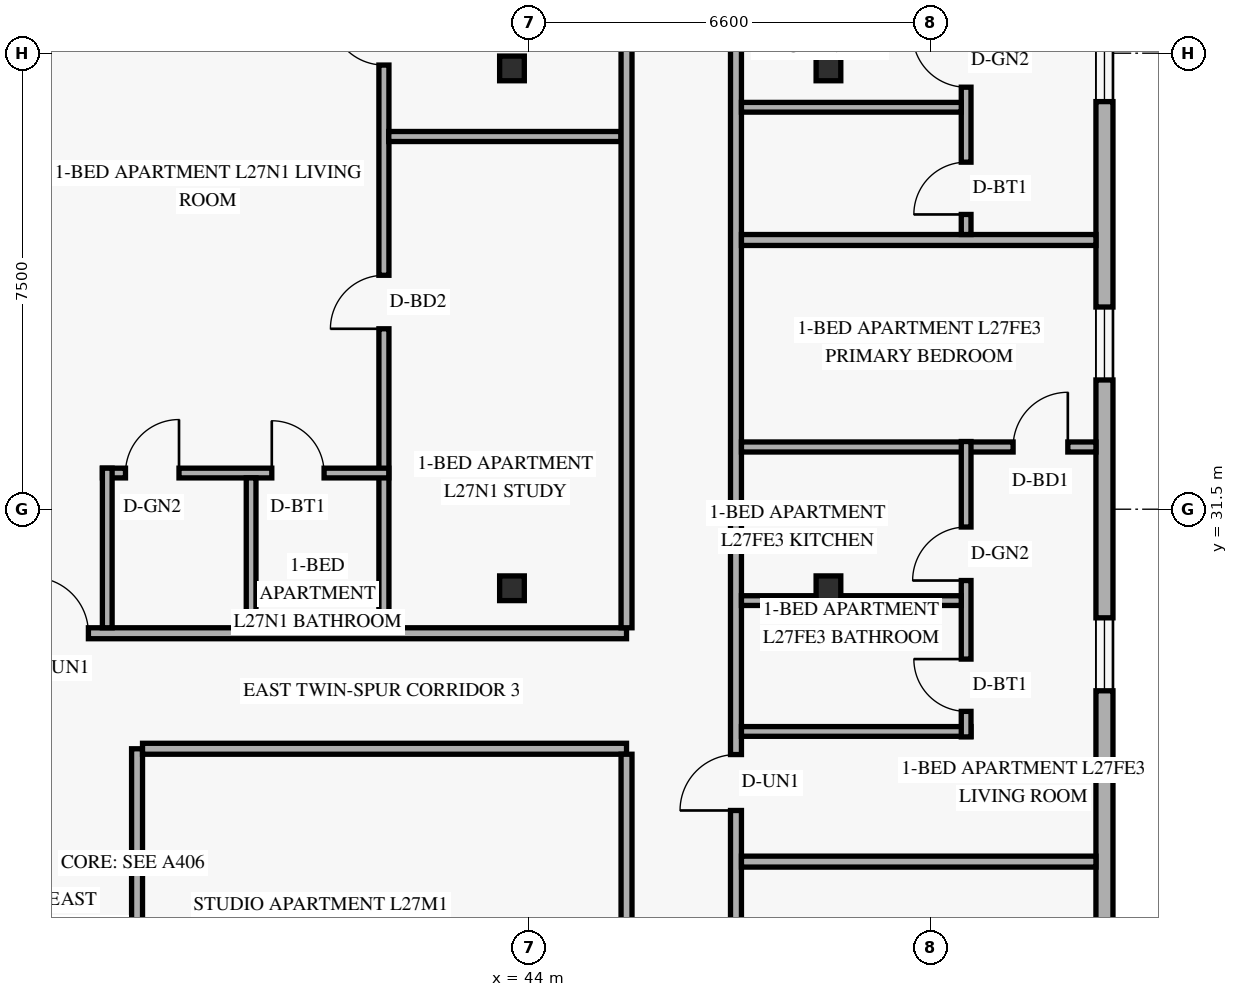
"""IFC4 building model, lengths in metres.
Left out: names, types, materials, properties, quantities, classifications, styles, units other than length and angle.
Written with IfcOpenShell. Run it as: python <this file> out.ifc"""

import sys

from ifc_helpers import new_model, si_unit, direction, frame, frame_2d, origin, origin_2d, place, context, subcontext, project, spatial, rectangle, hollow_rectangle, extrude, element, fill, save


model = new_model("IFC4")
c1 = context("Model", 3, precision=1e-05, world=origin(), true_north=direction((0.0, 1.0)))
c2 = subcontext(c1, "Body", "Model", "MODEL_VIEW")
j1 = project(units=[si_unit("LENGTHUNIT", "METRE"), si_unit("PLANEANGLEUNIT", "RADIAN")], contexts=[c1])
p1 = place(None, origin())
s1 = spatial("IfcSite", under=j1, at=p1, CompositionType="ELEMENT")
p2 = place(p1, origin())
s2 = spatial("IfcBuilding", under=s1, at=p2, CompositionType="ELEMENT")
p3 = place(p2, frame((0.0, 0.0, 106.2)))
s3 = spatial("IfcBuildingStorey", under=s2, at=p3, CompositionType="ELEMENT", Elevation=106.2)
for number, where, z_axis, x_axis in (
    (1, (43.653, 30.2, 0.0), (0.035, 0.0, 0.999), (0.0, 1.0, 0.0)),
    (2, (43.653, 38.75, 0.0), (0.035, 0.0, 0.999), (0.0, 1.0, 0.0)),
):
    element("IfcColumn", number, at=place(p3, frame(where, z_axis=z_axis, x_axis=x_axis)), inside=s3, PredefinedType="COLUMN", context=c2, shape_type="SweptSolid", body=[
        extrude(hollow_rectangle(XDim=0.406, YDim=0.406, WallThickness=0.016, at=origin_2d()), origin(), (0.0, 0.0, 1.0), 3.602),
    ])
for number, where, z_axis, x_axis in (
    (3, (48.816, 30.2, 0.0), (0.058, 0.0, 0.998), (0.0, 1.0, 0.0)),
    (4, (48.816, 38.75, 0.0), (0.058, 0.0, 0.998), (0.0, 1.0, 0.0)),
):
    element("IfcColumn", number, at=place(p3, frame(where, z_axis=z_axis, x_axis=x_axis)), inside=s3, PredefinedType="COLUMN", context=c2, shape_type="SweptSolid", body=[
        extrude(hollow_rectangle(XDim=0.406, YDim=0.406, WallThickness=0.016, at=origin_2d()), origin(), (0.0, 0.0, 1.0), 3.606),
    ])
p4 = place(p3, frame((53.46, 6.32, 0.0), z_axis=(0.0, 0.0, 1.0), x_axis=(0.0, 1.0, 0.0)))
e5 = element("IfcWall", 5, at=p4, inside=s3, PredefinedType="SOLIDWALL", context=c2, shape_type="SweptSolid", body=[
    extrude(rectangle(XDim=35.36, YDim=0.28, at=frame_2d((17.68, 0.0))), origin(), (0.0, 0.0, 1.0), 3.36),
])
p5 = place(p4, frame((3.128, 0.0, 0.85)))
e6 = element("IfcOpeningElement", 6, at=p5, cuts=e5, PredefinedType="OPENING", context=c2, shape_type="SweptSolid", body=[
    extrude(rectangle(XDim=1.2, YDim=1.5, at=frame_2d((0.6, 0.75))), frame((0.0, 0.15, 0.0), z_axis=(0.0, -1.0, 0.0), x_axis=(1.0, 0.0, 0.0)), (0.0, 0.0, 1.0), 0.3),
])
p6 = place(p4, frame((12.82, 0.0, 0.85)))
e7 = element("IfcOpeningElement", 7, at=p6, cuts=e5, PredefinedType="OPENING", context=c2, shape_type="SweptSolid", body=[
    extrude(rectangle(XDim=1.2, YDim=1.5, at=frame_2d((0.6, 0.75))), frame((0.0, 0.15, 0.0), z_axis=(0.0, -1.0, 0.0), x_axis=(1.0, 0.0, 0.0)), (0.0, 0.0, 1.0), 0.3),
])
p7 = place(p4, frame((22.194, 0.0, 0.85)))
e8 = element("IfcOpeningElement", 8, at=p7, cuts=e5, PredefinedType="OPENING", context=c2, shape_type="SweptSolid", body=[
    extrude(rectangle(XDim=1.2, YDim=1.5, at=frame_2d((0.6, 0.75))), frame((0.0, 0.15, 0.0), z_axis=(0.0, -1.0, 0.0), x_axis=(1.0, 0.0, 0.0)), (0.0, 0.0, 1.0), 0.3),
])
p8 = place(p4, frame((27.306, 0.0, 0.85)))
e9 = element("IfcOpeningElement", 9, at=p8, cuts=e5, PredefinedType="OPENING", context=c2, shape_type="SweptSolid", body=[
    extrude(rectangle(XDim=1.2, YDim=1.5, at=frame_2d((0.6, 0.75))), frame((0.0, 0.15, 0.0), z_axis=(0.0, -1.0, 0.0), x_axis=(1.0, 0.0, 0.0)), (0.0, 0.0, 1.0), 0.3),
])
p9 = place(p4, frame((31.884, 0.0, 0.85)))
e10 = element("IfcOpeningElement", 10, at=p9, cuts=e5, PredefinedType="OPENING", context=c2, shape_type="SweptSolid", body=[
    extrude(rectangle(XDim=1.2, YDim=1.5, at=frame_2d((0.6, 0.75))), frame((0.0, 0.15, 0.0), z_axis=(0.0, -1.0, 0.0), x_axis=(1.0, 0.0, 0.0)), (0.0, 0.0, 1.0), 0.3),
])
p10 = place(p3, frame((37.55, 17.28, 0.0), z_axis=(0.0, 0.0, 1.0), x_axis=(0.0, 1.0, 0.0)))
e11 = element("IfcWall", 11, at=p10, inside=s3, PredefinedType="STANDARD", context=c2, shape_type="SweptSolid", body=[
    extrude(rectangle(XDim=10.28, YDim=0.18, at=frame_2d((5.14, 0.0))), origin(), (0.0, 0.0, 1.0), 2.731),
])
p11 = place(p10, frame((5.0, 0.0, 0.0)))
e12 = element("IfcOpeningElement", 12, at=p11, cuts=e11, PredefinedType="OPENING", context=c2, shape_type="SweptSolid", body=[
    extrude(rectangle(XDim=0.92, YDim=2.15, at=frame_2d((0.46, 1.075))), frame((0.0, 0.1, 0.0), z_axis=(0.0, -1.0, 0.0), x_axis=(1.0, 0.0, 0.0)), (0.0, 0.0, 1.0), 0.2),
])
p12 = place(p3, frame((37.64, 27.56, 0.0), z_axis=(0.0, 0.0, 1.0), x_axis=(1.0, 0.0, 0.0)))
e13 = element("IfcWall", 13, at=p12, inside=s3, PredefinedType="STANDARD", context=c2, shape_type="SweptSolid", body=[
    extrude(rectangle(XDim=7.96, YDim=0.18, at=frame_2d((3.98, 0.0))), origin(), (0.0, 0.0, 1.0), 2.731),
])
p13 = place(p3, frame((35.51, 29.46, 0.0), z_axis=(0.0, 0.0, 1.0), x_axis=(1.0, 0.0, 0.0)))
e14 = element("IfcWall", 14, at=p13, inside=s3, PredefinedType="STANDARD", context=c2, shape_type="SweptSolid", body=[
    extrude(rectangle(XDim=10.09, YDim=0.18, at=frame_2d((5.045, 0.0))), origin(), (0.0, 0.0, 1.0), 2.731),
])
p14 = place(p13, frame((0.32, 0.0, 0.0)))
e15 = element("IfcOpeningElement", 15, at=p14, cuts=e14, PredefinedType="OPENING", context=c2, shape_type="SweptSolid", body=[
    extrude(rectangle(XDim=0.92, YDim=2.15, at=frame_2d((0.46, 1.075))), frame((0.0, 0.1, 0.0), z_axis=(0.0, -1.0, 0.0), x_axis=(1.0, 0.0, 0.0)), (0.0, 0.0, 1.0), 0.2),
])
p15 = place(p3, frame((41.61, 29.55, 0.0), z_axis=(0.0, 0.0, 1.0), x_axis=(0.0, 1.0, 0.0)))
e16 = element("IfcWall", 16, at=p15, inside=s3, PredefinedType="PARTITIONING", context=c2, shape_type="SweptSolid", body=[
    extrude(rectangle(XDim=15.47, YDim=0.165, at=frame_2d((7.735, 0.0))), origin(), (0.0, 0.0, 1.0), 2.731),
])
p16 = place(p15, frame((4.917, 0.0, 0.0)))
e17 = element("IfcOpeningElement", 17, at=p16, cuts=e16, PredefinedType="OPENING", context=c2, shape_type="SweptSolid", body=[
    extrude(rectangle(XDim=0.88, YDim=2.14, at=frame_2d((0.44, 1.07))), frame((0.0, 0.093, 0.0), z_axis=(0.0, -1.0, 0.0), x_axis=(1.0, 0.0, 0.0)), (0.0, 0.0, 1.0), 0.185),
])
p17 = place(p15, frame((9.255, 0.0, 0.0)))
e18 = element("IfcOpeningElement", 18, at=p17, cuts=e16, PredefinedType="OPENING", context=c2, shape_type="SweptSolid", body=[
    extrude(rectangle(XDim=0.88, YDim=2.12, at=frame_2d((0.44, 1.06))), frame((0.0, 0.093, 0.0), z_axis=(0.0, -1.0, 0.0), x_axis=(1.0, 0.0, 0.0)), (0.0, 0.0, 1.0), 0.185),
])
p18 = place(p3, frame((36.98, 32.095, 0.0), z_axis=(0.0, 0.0, 1.0), x_axis=(1.0, 0.0, 0.0)))
e19 = element("IfcWall", 19, at=p18, inside=s3, PredefinedType="PLUMBINGWALL", context=c2, shape_type="SweptSolid", body=[
    extrude(rectangle(XDim=4.71, YDim=0.16, at=frame_2d((2.355, 0.0))), origin(), (0.0, 0.0, 1.0), 3.36),
])
p19 = place(p18, frame((0.38, 0.0, 0.0)))
e20 = element("IfcOpeningElement", 20, at=p19, cuts=e19, PredefinedType="OPENING", context=c2, shape_type="SweptSolid", body=[
    extrude(rectangle(XDim=0.88, YDim=2.12, at=frame_2d((0.44, 1.06))), frame((0.0, 0.09, 0.0), z_axis=(0.0, -1.0, 0.0), x_axis=(1.0, 0.0, 0.0)), (0.0, 0.0, 1.0), 0.18),
])
p20 = place(p18, frame((2.786, 0.0, 0.0)))
e21 = element("IfcOpeningElement", 21, at=p20, cuts=e19, PredefinedType="OPENING", context=c2, shape_type="SweptSolid", body=[
    extrude(rectangle(XDim=0.86, YDim=2.12, at=frame_2d((0.43, 1.06))), frame((0.0, 0.09, 0.0), z_axis=(0.0, -1.0, 0.0), x_axis=(1.0, 0.0, 0.0)), (0.0, 0.0, 1.0), 0.18),
])
p21 = place(p3, frame((37.06, 29.55, 0.0), z_axis=(0.0, 0.0, 1.0), x_axis=(0.0, 1.0, 0.0)))
e22 = element("IfcWall", 22, at=p21, inside=s3, PredefinedType="PLUMBINGWALL", context=c2, shape_type="SweptSolid", body=[
    extrude(rectangle(XDim=2.625, YDim=0.16, at=frame_2d((1.312, 0.0))), origin(), (0.0, 0.0, 1.0), 2.731),
])
p22 = place(p3, frame((39.426, 29.55, 0.0), z_axis=(0.0, 0.0, 1.0), x_axis=(0.0, 1.0, 0.0)))
e23 = element("IfcWall", 23, at=p22, inside=s3, PredefinedType="PLUMBINGWALL", context=c2, shape_type="SweptSolid", body=[
    extrude(rectangle(XDim=2.465, YDim=0.16, at=frame_2d((1.232, 0.0))), origin(), (0.0, 0.0, 1.0), 2.731),
])
p23 = place(p3, frame((41.69, 37.63, 0.0), z_axis=(0.0, 0.0, 1.0), x_axis=(1.0, 0.0, 0.0)))
e24 = element("IfcWall", 24, at=p23, inside=s3, PredefinedType="PARTITIONING", context=c2, shape_type="SweptSolid", body=[
    extrude(rectangle(XDim=3.82, YDim=0.165, at=frame_2d((1.91, 0.0))), origin(), (0.0, 0.0, 1.0), 2.731),
])
p24 = place(p3, frame((47.4, 2.98, 0.0), z_axis=(0.0, 0.0, 1.0), x_axis=(0.0, 1.0, 0.0)))
e25 = element("IfcWall", 25, at=p24, inside=s3, PredefinedType="STANDARD", context=c2, shape_type="SweptSolid", body=[
    extrude(rectangle(XDim=42.04, YDim=0.18, at=frame_2d((21.02, 0.0))), origin(), (0.0, 0.0, 1.0), 2.731),
])
p25 = place(p24, frame((4.716, 0.0, 0.0)))
e26 = element("IfcOpeningElement", 26, at=p25, cuts=e25, PredefinedType="OPENING", context=c2, shape_type="SweptSolid", body=[
    extrude(rectangle(XDim=0.92, YDim=2.15, at=frame_2d((0.46, 1.075))), frame((0.0, 0.1, 0.0), z_axis=(0.0, -1.0, 0.0), x_axis=(1.0, 0.0, 0.0)), (0.0, 0.0, 1.0), 0.2),
])
p26 = place(p24, frame((15.796, 0.0, 0.0)))
e27 = element("IfcOpeningElement", 27, at=p26, cuts=e25, PredefinedType="OPENING", context=c2, shape_type="SweptSolid", body=[
    extrude(rectangle(XDim=0.92, YDim=2.15, at=frame_2d((0.46, 1.075))), frame((0.0, 0.1, 0.0), z_axis=(0.0, -1.0, 0.0), x_axis=(1.0, 0.0, 0.0)), (0.0, 0.0, 1.0), 0.2),
])
p27 = place(p24, frame((23.565, 0.0, 0.0)))
e28 = element("IfcOpeningElement", 28, at=p27, cuts=e25, PredefinedType="OPENING", context=c2, shape_type="SweptSolid", body=[
    extrude(rectangle(XDim=0.92, YDim=2.15, at=frame_2d((0.46, 1.075))), frame((0.0, 0.1, 0.0), z_axis=(0.0, -1.0, 0.0), x_axis=(1.0, 0.0, 0.0)), (0.0, 0.0, 1.0), 0.2),
])
p28 = place(p24, frame((39.348, 0.0, 0.0)))
e29 = element("IfcOpeningElement", 29, at=p28, cuts=e25, PredefinedType="OPENING", context=c2, shape_type="SweptSolid", body=[
    extrude(rectangle(XDim=0.92, YDim=2.15, at=frame_2d((0.46, 1.075))), frame((0.0, 0.1, 0.0), z_axis=(0.0, -1.0, 0.0), x_axis=(1.0, 0.0, 0.0)), (0.0, 0.0, 1.0), 0.2),
])
p29 = place(p3, frame((45.6, 17.37, 0.0), z_axis=(0.0, 0.0, 1.0), x_axis=(0.0, 1.0, 0.0)))
e30 = element("IfcWall", 30, at=p29, inside=s3, PredefinedType="STANDARD", context=c2, shape_type="SweptSolid", body=[
    extrude(rectangle(XDim=10.1, YDim=0.18, at=frame_2d((5.05, 0.0))), origin(), (0.0, 0.0, 1.0), 2.731),
])
p30 = place(p3, frame((45.6, 29.55, 0.0), z_axis=(0.0, 0.0, 1.0), x_axis=(0.0, 1.0, 0.0)))
e31 = element("IfcWall", 31, at=p30, inside=s3, PredefinedType="STANDARD", context=c2, shape_type="SweptSolid", body=[
    extrude(rectangle(XDim=15.47, YDim=0.18, at=frame_2d((7.735, 0.0))), origin(), (0.0, 0.0, 1.0), 2.731),
])
p31 = place(p3, frame((47.49, 25.704, 0.0), z_axis=(0.0, 0.0, 1.0), x_axis=(1.0, 0.0, 0.0)))
e32 = element("IfcWall", 32, at=p31, inside=s3, PredefinedType="PARTITIONING", context=c2, shape_type="SweptSolid", body=[
    extrude(rectangle(XDim=5.83, YDim=0.18, at=frame_2d((2.915, 0.0))), origin(), (0.0, 0.0, 1.0), 2.809),
])
p32 = place(p3, frame((47.49, 32.523, 0.0), z_axis=(0.0, 0.0, 1.0), x_axis=(1.0, 0.0, 0.0)))
e33 = element("IfcWall", 33, at=p32, inside=s3, PredefinedType="PARTITIONING", context=c2, shape_type="SweptSolid", body=[
    extrude(rectangle(XDim=5.83, YDim=0.165, at=frame_2d((2.915, 0.0))), origin(), (0.0, 0.0, 1.0), 2.809),
])
p33 = place(p32, frame((4.468, 0.0, 0.0)))
e34 = element("IfcOpeningElement", 34, at=p33, cuts=e33, PredefinedType="OPENING", context=c2, shape_type="SweptSolid", body=[
    extrude(rectangle(XDim=0.9, YDim=2.14, at=frame_2d((0.45, 1.07))), frame((0.0, 0.093, 0.0), z_axis=(0.0, -1.0, 0.0), x_axis=(1.0, 0.0, 0.0)), (0.0, 0.0, 1.0), 0.185),
])
p34 = place(p3, frame((47.49, 27.845, 0.0), z_axis=(0.0, 0.0, 1.0), x_axis=(1.0, 0.0, 0.0)))
e35 = element("IfcWall", 35, at=p34, inside=s3, PredefinedType="PLUMBINGWALL", context=c2, shape_type="SweptSolid", body=[
    extrude(rectangle(XDim=3.775, YDim=0.16, at=frame_2d((1.888, 0.0))), origin(), (0.0, 0.0, 1.0), 2.809),
])
p35 = place(p3, frame((51.185, 27.755, 0.0), z_axis=(0.0, 0.0, 1.0), x_axis=(0.0, 1.0, 0.0)))
e36 = element("IfcWall", 36, at=p35, inside=s3, PredefinedType="PLUMBINGWALL", context=c2, shape_type="SweptSolid", body=[
    extrude(rectangle(XDim=4.859, YDim=0.16, at=frame_2d((2.429, 0.0))), origin(), (0.0, 0.0, 1.0), 3.36),
])
p36 = place(p35, frame((0.42, 0.0, 0.0)))
e37 = element("IfcOpeningElement", 37, at=p36, cuts=e36, PredefinedType="OPENING", context=c2, shape_type="SweptSolid", body=[
    extrude(rectangle(XDim=0.86, YDim=2.12, at=frame_2d((0.43, 1.06))), frame((0.0, 0.09, 0.0), z_axis=(0.0, -1.0, 0.0), x_axis=(1.0, 0.0, 0.0)), (0.0, 0.0, 1.0), 0.18),
])
p37 = place(p35, frame((2.572, 0.0, 0.0)))
e38 = element("IfcOpeningElement", 38, at=p37, cuts=e36, PredefinedType="OPENING", context=c2, shape_type="SweptSolid", body=[
    extrude(rectangle(XDim=0.88, YDim=2.12, at=frame_2d((0.44, 1.06))), frame((0.0, 0.09, 0.0), z_axis=(0.0, -1.0, 0.0), x_axis=(1.0, 0.0, 0.0)), (0.0, 0.0, 1.0), 0.18),
])
p38 = place(p3, frame((47.49, 29.997, 0.0), z_axis=(0.0, 0.0, 1.0), x_axis=(1.0, 0.0, 0.0)))
e39 = element("IfcWall", 39, at=p38, inside=s3, PredefinedType="PLUMBINGWALL", context=c2, shape_type="SweptSolid", body=[
    extrude(rectangle(XDim=3.615, YDim=0.16, at=frame_2d((1.808, 0.0))), origin(), (0.0, 0.0, 1.0), 2.731),
])
p39 = place(p3, frame((47.49, 35.928, 0.0), z_axis=(0.0, 0.0, 1.0), x_axis=(1.0, 0.0, 0.0)))
e40 = element("IfcWall", 40, at=p39, inside=s3, PredefinedType="PARTITIONING", context=c2, shape_type="SweptSolid", body=[
    extrude(rectangle(XDim=5.83, YDim=0.18, at=frame_2d((2.915, 0.0))), origin(), (0.0, 0.0, 1.0), 2.809),
])
p40 = place(p3, frame((51.185, 36.018, 0.0), z_axis=(0.0, 0.0, 1.0), x_axis=(0.0, 1.0, 0.0)))
e41 = element("IfcWall", 41, at=p40, inside=s3, PredefinedType="PLUMBINGWALL", context=c2, shape_type="SweptSolid", body=[
    extrude(rectangle(XDim=4.64, YDim=0.16, at=frame_2d((2.32, 0.0))), origin(), (0.0, 0.0, 1.0), 3.36),
])
p41 = place(p40, frame((0.33, 0.0, 0.0)))
e42 = element("IfcOpeningElement", 42, at=p41, cuts=e41, PredefinedType="OPENING", context=c2, shape_type="SweptSolid", body=[
    extrude(rectangle(XDim=0.86, YDim=2.12, at=frame_2d((0.43, 1.06))), frame((0.0, 0.09, 0.0), z_axis=(0.0, -1.0, 0.0), x_axis=(1.0, 0.0, 0.0)), (0.0, 0.0, 1.0), 0.18),
])
p42 = place(p40, frame((2.423, 0.0, 0.0)))
e43 = element("IfcOpeningElement", 43, at=p42, cuts=e41, PredefinedType="OPENING", context=c2, shape_type="SweptSolid", body=[
    extrude(rectangle(XDim=0.88, YDim=2.12, at=frame_2d((0.44, 1.06))), frame((0.0, 0.09, 0.0), z_axis=(0.0, -1.0, 0.0), x_axis=(1.0, 0.0, 0.0)), (0.0, 0.0, 1.0), 0.18),
])
p43 = place(p3, frame((47.49, 38.111, 0.0), z_axis=(0.0, 0.0, 1.0), x_axis=(1.0, 0.0, 0.0)))
e44 = element("IfcWall", 44, at=p43, inside=s3, PredefinedType="PLUMBINGWALL", context=c2, shape_type="SweptSolid", body=[
    extrude(rectangle(XDim=3.615, YDim=0.16, at=frame_2d((1.808, 0.0))), origin(), (0.0, 0.0, 1.0), 2.809),
])
p44 = place(p7, origin())
e45 = element("IfcWindow", 45, at=p44, inside=s3, PartitioningType="SINGLE_PANEL", PredefinedType="WINDOW", context=c2, shape_type="SweptSolid", body=[
    extrude(rectangle(XDim=1.2, YDim=1.5, at=frame_2d((0.6, 0.75))), frame((0.0, 0.03, 0.0), z_axis=(0.0, -1.0, 0.0), x_axis=(1.0, 0.0, 0.0)), (0.0, 0.0, 1.0), 0.06),
])
fill(e8, e45)
p45 = place(p8, origin())
e46 = element("IfcWindow", 46, at=p45, inside=s3, PartitioningType="SINGLE_PANEL", PredefinedType="WINDOW", context=c2, shape_type="SweptSolid", body=[
    extrude(rectangle(XDim=1.2, YDim=1.5, at=frame_2d((0.6, 0.75))), frame((0.0, 0.03, 0.0), z_axis=(0.0, -1.0, 0.0), x_axis=(1.0, 0.0, 0.0)), (0.0, 0.0, 1.0), 0.06),
])
fill(e9, e46)
p46 = place(p9, origin())
e47 = element("IfcWindow", 47, at=p46, inside=s3, PartitioningType="SINGLE_PANEL", PredefinedType="WINDOW", context=c2, shape_type="SweptSolid", body=[
    extrude(rectangle(XDim=1.2, YDim=1.5, at=frame_2d((0.6, 0.75))), frame((0.0, 0.03, 0.0), z_axis=(0.0, -1.0, 0.0), x_axis=(1.0, 0.0, 0.0)), (0.0, 0.0, 1.0), 0.06),
])
fill(e10, e47)
p47 = place(p14, origin())
e48 = element("IfcDoor", 48, at=p47, inside=s3, OperationType="SINGLE_SWING_LEFT", PredefinedType="DOOR", context=c2, shape_type="SweptSolid", body=[
    extrude(rectangle(XDim=0.92, YDim=2.15, at=frame_2d((0.46, 1.075))), frame((0.0, 0.025, 0.0), z_axis=(0.0, -1.0, 0.0), x_axis=(1.0, 0.0, 0.0)), (0.0, 0.0, 1.0), 0.05),
])
fill(e15, e48)
p48 = place(p19, origin())
e49 = element("IfcDoor", 49, at=p48, inside=s3, OperationType="SINGLE_SWING_RIGHT", PredefinedType="DOOR", context=c2, shape_type="SweptSolid", body=[
    extrude(rectangle(XDim=0.88, YDim=2.12, at=frame_2d((0.44, 1.06))), frame((0.0, 0.025, 0.0), z_axis=(0.0, -1.0, 0.0), x_axis=(1.0, 0.0, 0.0)), (0.0, 0.0, 1.0), 0.05),
])
fill(e20, e49)
p49 = place(p20, origin())
e50 = element("IfcDoor", 50, at=p49, inside=s3, OperationType="SINGLE_SWING_LEFT", PredefinedType="DOOR", context=c2, shape_type="SweptSolid", body=[
    extrude(rectangle(XDim=0.86, YDim=2.12, at=frame_2d((0.43, 1.06))), frame((0.0, 0.025, 0.0), z_axis=(0.0, -1.0, 0.0), x_axis=(1.0, 0.0, 0.0)), (0.0, 0.0, 1.0), 0.05),
])
fill(e21, e50)
p50 = place(p16, origin())
e51 = element("IfcDoor", 51, at=p50, inside=s3, OperationType="SINGLE_SWING_LEFT", PredefinedType="DOOR", context=c2, shape_type="SweptSolid", body=[
    extrude(rectangle(XDim=0.88, YDim=2.14, at=frame_2d((0.44, 1.07))), frame((0.0, 0.025, 0.0), z_axis=(0.0, -1.0, 0.0), x_axis=(1.0, 0.0, 0.0)), (0.0, 0.0, 1.0), 0.05),
])
fill(e17, e51)
p51 = place(p17, origin())
e52 = element("IfcDoor", 52, at=p51, inside=s3, OperationType="SINGLE_SWING_RIGHT", PredefinedType="DOOR", context=c2, shape_type="SweptSolid", body=[
    extrude(rectangle(XDim=0.88, YDim=2.12, at=frame_2d((0.44, 1.06))), frame((0.0, 0.025, 0.0), z_axis=(0.0, -1.0, 0.0), x_axis=(1.0, 0.0, 0.0)), (0.0, 0.0, 1.0), 0.05),
])
fill(e18, e52)
p52 = place(p27, origin())
e53 = element("IfcDoor", 53, at=p52, inside=s3, OperationType="SINGLE_SWING_LEFT", PredefinedType="DOOR", context=c2, shape_type="SweptSolid", body=[
    extrude(rectangle(XDim=0.92, YDim=2.15, at=frame_2d((0.46, 1.075))), frame((0.0, 0.025, 0.0), z_axis=(0.0, -1.0, 0.0), x_axis=(1.0, 0.0, 0.0)), (0.0, 0.0, 1.0), 0.05),
])
fill(e28, e53)
p53 = place(p36, origin())
e54 = element("IfcDoor", 54, at=p53, inside=s3, OperationType="SINGLE_SWING_RIGHT", PredefinedType="DOOR", context=c2, shape_type="SweptSolid", body=[
    extrude(rectangle(XDim=0.86, YDim=2.12, at=frame_2d((0.43, 1.06))), frame((0.0, 0.025, 0.0), z_axis=(0.0, -1.0, 0.0), x_axis=(1.0, 0.0, 0.0)), (0.0, 0.0, 1.0), 0.05),
])
fill(e37, e54)
p54 = place(p37, origin())
e55 = element("IfcDoor", 55, at=p54, inside=s3, OperationType="SINGLE_SWING_LEFT", PredefinedType="DOOR", context=c2, shape_type="SweptSolid", body=[
    extrude(rectangle(XDim=0.88, YDim=2.12, at=frame_2d((0.44, 1.06))), frame((0.0, 0.025, 0.0), z_axis=(0.0, -1.0, 0.0), x_axis=(1.0, 0.0, 0.0)), (0.0, 0.0, 1.0), 0.05),
])
fill(e38, e55)
p55 = place(p33, origin())
e56 = element("IfcDoor", 56, at=p55, inside=s3, OperationType="SINGLE_SWING_RIGHT", PredefinedType="DOOR", context=c2, shape_type="SweptSolid", body=[
    extrude(rectangle(XDim=0.9, YDim=2.14, at=frame_2d((0.45, 1.07))), frame((0.0, 0.025, 0.0), z_axis=(0.0, -1.0, 0.0), x_axis=(1.0, 0.0, 0.0)), (0.0, 0.0, 1.0), 0.05),
])
fill(e34, e56)
p56 = place(p41, origin())
e57 = element("IfcDoor", 57, at=p56, inside=s3, OperationType="SINGLE_SWING_LEFT", PredefinedType="DOOR", context=c2, shape_type="SweptSolid", body=[
    extrude(rectangle(XDim=0.86, YDim=2.12, at=frame_2d((0.43, 1.06))), frame((0.0, 0.025, 0.0), z_axis=(0.0, -1.0, 0.0), x_axis=(1.0, 0.0, 0.0)), (0.0, 0.0, 1.0), 0.05),
])
fill(e42, e57)
p57 = place(p42, origin())
e58 = element("IfcDoor", 58, at=p57, inside=s3, OperationType="SINGLE_SWING_RIGHT", PredefinedType="DOOR", context=c2, shape_type="SweptSolid", body=[
    extrude(rectangle(XDim=0.88, YDim=2.12, at=frame_2d((0.44, 1.06))), frame((0.0, 0.025, 0.0), z_axis=(0.0, -1.0, 0.0), x_axis=(1.0, 0.0, 0.0)), (0.0, 0.0, 1.0), 0.05),
])
fill(e43, e58)
save(model, sys.argv[1])
